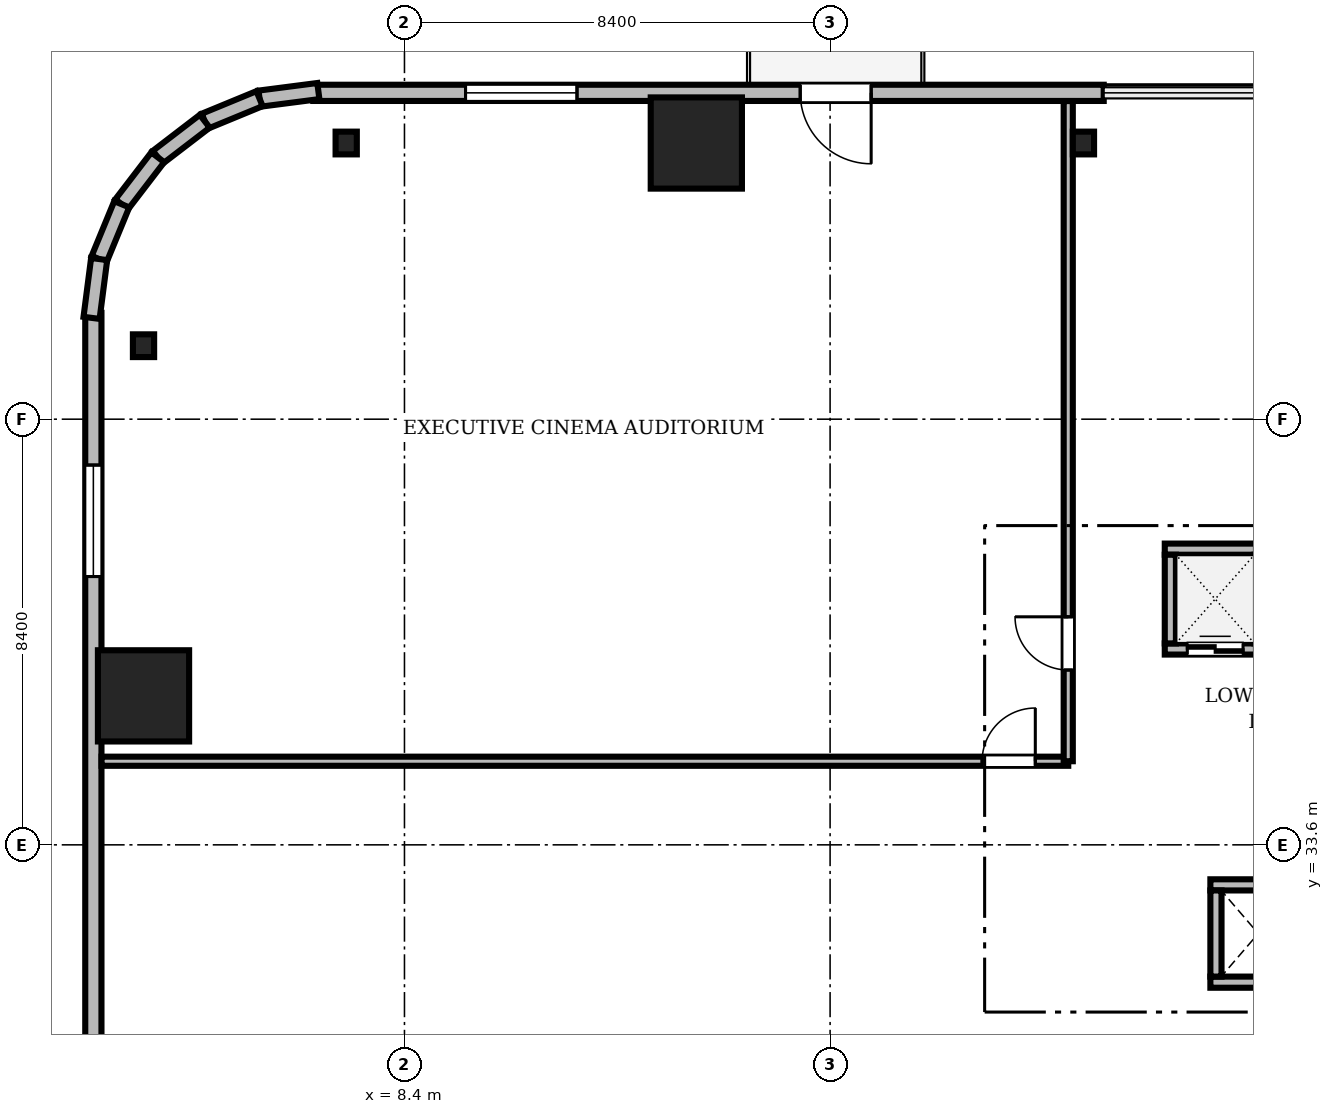
"""IFC4 building model, lengths in metres.
Left out: names, types, materials, properties, quantities, classifications, styles, units other than length and angle.
Written with IfcOpenShell. Run it as: python <this file> out.ifc"""

import sys

from ifc_helpers import new_model, si_unit, direction, frame, frame_2d, origin, origin_2d, place, context, subcontext, project, spatial, rectangle, i_section, extrude, source, transform, mapped, element, fill, save


model = new_model("IFC4")
c1 = context("Model", 3, precision=1e-05, world=origin(), true_north=direction((0.0, 1.0)))
c2 = subcontext(c1, "Body", "Model", "MODEL_VIEW")
j1 = project(units=[si_unit("LENGTHUNIT", "METRE"), si_unit("PLANEANGLEUNIT", "RADIAN")], contexts=[c1])
p1 = place(None, origin())
s1 = spatial("IfcSite", under=j1, at=p1, CompositionType="ELEMENT")
p2 = place(p1, origin())
s2 = spatial("IfcBuilding", under=s1, at=p2, CompositionType="ELEMENT")
p3 = place(p2, frame((0.0, 0.0, 89.65)))
s3 = spatial("IfcBuildingStorey", under=s2, at=p3, CompositionType="ELEMENT", Elevation=89.65)
m1 = source(origin(), c2, "Body", "SweptSolid", [
    extrude(rectangle(XDim=1.8, YDim=1.8, at=origin_2d()), origin(), (0.0, 0.0, 1.0), 3.0),
])
for number, where, z_axis, x_axis in (
    (1, (14.16, 47.45, 0.0), (0.0, 0.0, 1.0), (1.0, 0.0, 0.0)),
    (2, (3.25, 36.54, 0.0), (0.0, 0.0, 1.0), (1.0, 0.0, 0.0)),
):
    element("IfcColumn", number, at=place(p3, frame(where, z_axis=z_axis, x_axis=x_axis)), inside=s3, PredefinedType="COLUMN", context=c2, shape_type="MappedRepresentation", body=[
        mapped(m1, transform((0.0, 0.0, 0.0), scale=1.0)),
    ])
m2 = source(origin(), c2, "Body", "SweptSolid", [
    extrude(i_section(OverallWidth=0.419, OverallDepth=0.449, WebThickness=0.031, FlangeThickness=0.048, FilletRadius=0.015, at=origin_2d()), origin(), (0.0, 0.0, 1.0), 3.0),
])
for number, where, z_axis, x_axis in (
    (3, (21.8, 47.45, 0.0), (0.0, 0.0, 1.0), (1.0, 0.0, 0.0)),
    (4, (7.25, 47.45, 0.0), (0.0, 0.0, 1.0), (1.0, 0.0, 0.0)),
    (5, (3.25, 43.45, 0.0), (0.0, 0.0, 1.0), (1.0, 0.0, 0.0)),
):
    element("IfcColumn", number, at=place(p3, frame(where, z_axis=z_axis, x_axis=x_axis)), inside=s3, PredefinedType="COLUMN", context=c2, shape_type="MappedRepresentation", body=[
        mapped(m2, transform((0.0, 0.0, 0.0), scale=1.0)),
    ])
m3 = source(origin(), c2, "Body", "SweptSolid", [
    extrude(rectangle(XDim=15.6, YDim=0.32, at=frame_2d((7.8, 0.0))), origin(), (0.0, 0.0, 1.0), 3.0),
])
p4 = place(p3, frame((22.2, 48.44, 0.0), z_axis=(0.0, 0.0, 1.0), x_axis=(-1.0, 0.0, 0.0)))
e6 = element("IfcWall", 6, at=p4, inside=s3, PredefinedType="SOLIDWALL", context=c2, shape_type="MappedRepresentation", body=[
    mapped(m3, transform((0.0, 0.0, 0.0), scale=1.0)),
])
m4 = source(origin(), c2, "Body", "SweptSolid", [
    extrude(rectangle(XDim=1.4, YDim=2.3, at=frame_2d((0.7, 1.15))), frame((0.0, 0.17, 0.0), z_axis=(0.0, -1.0, 0.0), x_axis=(1.0, 0.0, 0.0)), (0.0, 0.0, 1.0), 0.34),
])
p5 = place(p4, frame((4.59, 0.0, 0.0)))
e7 = element("IfcOpeningElement", 7, at=p5, cuts=e6, PredefinedType="OPENING", context=c2, shape_type="MappedRepresentation", body=[
    mapped(m4, transform((0.0, 0.0, 0.0), scale=1.0)),
])
m5 = source(origin(), c2, "Body", "SweptSolid", [
    extrude(rectangle(XDim=2.2, YDim=2.4, at=frame_2d((1.1, 1.2))), frame((0.0, 0.17, 0.0), z_axis=(0.0, -1.0, 0.0), x_axis=(1.0, 0.0, 0.0)), (0.0, 0.0, 1.0), 0.34),
])
p6 = place(p4, frame((10.395, 0.0, 0.35)))
e8 = element("IfcOpeningElement", 8, at=p6, cuts=e6, PredefinedType="OPENING", context=c2, shape_type="MappedRepresentation", body=[
    mapped(m5, transform((0.0, 0.0, 0.0), scale=1.0)),
])
m6 = source(origin(), c2, "Body", "SweptSolid", [
    extrude(rectangle(XDim=15.6, YDim=0.32, at=frame_2d((7.8, 0.0))), origin(), (0.0, 0.0, 1.0), 3.0),
])
p7 = place(p3, frame((2.26, 44.1, 0.0), z_axis=(0.0, 0.0, 1.0), x_axis=(0.0, -1.0, 0.0)))
e9 = element("IfcWall", 9, at=p7, inside=s3, PredefinedType="SOLIDWALL", context=c2, shape_type="MappedRepresentation", body=[
    mapped(m6, transform((0.0, 0.0, 0.0), scale=1.0)),
])
p8 = place(p7, frame((3.005, 0.0, 0.35)))
e10 = element("IfcOpeningElement", 10, at=p8, cuts=e9, PredefinedType="OPENING", context=c2, shape_type="MappedRepresentation", body=[
    mapped(m5, transform((0.0, 0.0, 0.0), scale=1.0)),
])
m7 = source(origin(), c2, "Body", "SweptSolid", [
    extrude(rectangle(XDim=1.17, YDim=0.32, at=frame_2d((0.585, 0.0))), origin(), (0.0, 0.0, 1.0), 3.0),
])
p9 = place(p3, frame((6.7, 48.476, 0.0), z_axis=(0.0, 0.0, 1.0), x_axis=(-0.991735963317, -0.128295670475, 0.0)))
e11 = element("IfcWall", 11, at=p9, inside=s3, PredefinedType="SOLIDWALL", context=c2, shape_type="MappedRepresentation", body=[
    mapped(m7, transform((0.0, 0.0, 0.0), scale=1.0)),
])
m8 = source(origin(), c2, "Body", "SweptSolid", [
    extrude(rectangle(XDim=1.169, YDim=0.32, at=frame_2d((0.584, 0.0))), origin(), (0.0, 0.0, 1.0), 3.0),
])
p10 = place(p3, frame((5.54, 48.325, 0.0), z_axis=(0.0, 0.0, 1.0), x_axis=(-0.924552646638, -0.381054331552, 0.0)))
e12 = element("IfcWall", 12, at=p10, inside=s3, PredefinedType="SOLIDWALL", context=c2, shape_type="MappedRepresentation", body=[
    mapped(m8, transform((0.0, 0.0, 0.0), scale=1.0)),
])
m9 = source(origin(), c2, "Body", "SweptSolid", [
    extrude(rectangle(XDim=1.169, YDim=0.32, at=frame_2d((0.584, 0.0))), origin(), (0.0, 0.0, 1.0), 3.0),
])
p11 = place(p3, frame((4.459, 47.88, 0.0), z_axis=(0.0, 0.0, 1.0), x_axis=(-0.793663520347, -0.608356981114, 0.0)))
e13 = element("IfcWall", 13, at=p11, inside=s3, PredefinedType="SOLIDWALL", context=c2, shape_type="MappedRepresentation", body=[
    mapped(m9, transform((0.0, 0.0, 0.0), scale=1.0)),
])
m10 = source(origin(), c2, "Body", "SweptSolid", [
    extrude(rectangle(XDim=1.169, YDim=0.32, at=frame_2d((0.584, 0.0))), origin(), (0.0, 0.0, 1.0), 3.0),
])
p12 = place(p3, frame((3.531, 47.169, 0.0), z_axis=(0.0, 0.0, 1.0), x_axis=(-0.608387696831, -0.793639975269, 0.0)))
e14 = element("IfcWall", 14, at=p12, inside=s3, PredefinedType="SOLIDWALL", context=c2, shape_type="MappedRepresentation", body=[
    mapped(m10, transform((0.0, 0.0, 0.0), scale=1.0)),
])
p13 = place(p3, frame((2.82, 46.241, 0.0), z_axis=(0.0, 0.0, 1.0), x_axis=(-0.381054331552, -0.924552646638, 0.0)))
e15 = element("IfcWall", 15, at=p13, inside=s3, PredefinedType="SOLIDWALL", context=c2, shape_type="MappedRepresentation", body=[
    mapped(m8, transform((0.0, 0.0, 0.0), scale=1.0)),
])
p14 = place(p3, frame((2.375, 45.16, 0.0), z_axis=(0.0, 0.0, 1.0), x_axis=(-0.128295670475, -0.991735963317, 0.0)))
e16 = element("IfcWall", 16, at=p14, inside=s3, PredefinedType="SOLIDWALL", context=c2, shape_type="MappedRepresentation", body=[
    mapped(m7, transform((0.0, 0.0, 0.0), scale=1.0)),
])
m11 = source(origin(), c2, "Body", "SweptSolid", [
    extrude(rectangle(XDim=1.99, YDim=0.22, at=frame_2d((0.995, 0.0))), origin(), (0.0, 0.0, 1.0), 3.0),
])
p15 = place(p3, frame((23.405, 37.465, 0.0), z_axis=(0.0, 0.0, 1.0), x_axis=(1.0, 0.0, 0.0)))
e17 = element("IfcWall", 17, at=p15, inside=s3, PredefinedType="SOLIDWALL", context=c2, shape_type="MappedRepresentation", body=[
    mapped(m11, transform((0.0, 0.0, 0.0), scale=1.0)),
])
m12 = source(origin(), c2, "Body", "SweptSolid", [
    extrude(rectangle(XDim=1.1, YDim=2.2, at=frame_2d((0.55, 1.1))), frame((0.0, 0.12, 0.0), z_axis=(0.0, -1.0, 0.0), x_axis=(1.0, 0.0, 0.0)), (0.0, 0.0, 1.0), 0.24),
])
p16 = place(p15, frame((0.445, 0.0, 0.0)))
e18 = element("IfcOpeningElement", 18, at=p16, cuts=e17, PredefinedType="OPENING", context=c2, shape_type="MappedRepresentation", body=[
    mapped(m12, transform((0.0, 0.0, 0.0), scale=1.0)),
])
p17 = place(p3, frame((23.405, 39.435, 0.0), z_axis=(0.0, 0.0, 1.0), x_axis=(1.0, 0.0, 0.0)))
e19 = element("IfcWall", 19, at=p17, inside=s3, PredefinedType="SOLIDWALL", context=c2, shape_type="MappedRepresentation", body=[
    mapped(m11, transform((0.0, 0.0, 0.0), scale=1.0)),
])
m13 = source(origin(), c2, "Body", "SweptSolid", [
    extrude(rectangle(XDim=1.75, YDim=0.22, at=frame_2d((0.875, 0.0))), origin(), (0.0, 0.0, 1.0), 3.0),
])
p18 = place(p3, frame((23.515, 37.575, 0.0), z_axis=(0.0, 0.0, 1.0), x_axis=(0.0, 1.0, 0.0)))
e20 = element("IfcWall", 20, at=p18, inside=s3, PredefinedType="SOLIDWALL", context=c2, shape_type="MappedRepresentation", body=[
    mapped(m13, transform((0.0, 0.0, 0.0), scale=1.0)),
])
m14 = source(origin(), c2, "Body", "SweptSolid", [
    extrude(rectangle(XDim=1.89, YDim=0.22, at=frame_2d((0.945, 0.0))), origin(), (0.0, 0.0, 1.0), 3.0),
])
for number, where, z_axis, x_axis in (
    (21, (24.305, 30.89, 0.0), (0.0, 0.0, 1.0), (1.0, 0.0, 0.0)),
    (22, (24.305, 32.81, 0.0), (0.0, 0.0, 1.0), (1.0, 0.0, 0.0)),
):
    element("IfcWall", number, at=place(p3, frame(where, z_axis=z_axis, x_axis=x_axis)), inside=s3, PredefinedType="SOLIDWALL", context=c2, shape_type="MappedRepresentation", body=[
        mapped(m14, transform((0.0, 0.0, 0.0), scale=1.0)),
    ])
m15 = source(origin(), c2, "Body", "SweptSolid", [
    extrude(rectangle(XDim=1.7, YDim=0.22, at=frame_2d((0.85, 0.0))), origin(), (0.0, 0.0, 1.0), 3.0),
])
p19 = place(p3, frame((24.415, 31.0, 0.0), z_axis=(0.0, 0.0, 1.0), x_axis=(0.0, 1.0, 0.0)))
e23 = element("IfcWall", 23, at=p19, inside=s3, PredefinedType="SOLIDWALL", context=c2, shape_type="MappedRepresentation", body=[
    mapped(m15, transform((0.0, 0.0, 0.0), scale=1.0)),
])
m16 = source(origin(), c2, "Body", "SweptSolid", [
    extrude(rectangle(XDim=19.078, YDim=0.18, at=frame_2d((9.539, 0.0))), origin(), (0.0, 0.0, 1.0), 2.276),
])
p20 = place(p3, frame((2.422, 35.25, 0.0), z_axis=(0.0, 0.0, 1.0), x_axis=(1.0, 0.0, 0.0)))
e24 = element("IfcWall", 24, at=p20, inside=s3, PredefinedType="PARTITIONING", context=c2, shape_type="MappedRepresentation", body=[
    mapped(m16, transform((0.0, 0.0, 0.0), scale=1.0)),
])
m17 = source(origin(), c2, "Body", "SweptSolid", [
    extrude(rectangle(XDim=1.05, YDim=2.2, at=frame_2d((0.525, 1.1))), frame((0.0, 0.1, 0.0), z_axis=(0.0, -1.0, 0.0), x_axis=(1.0, 0.0, 0.0)), (0.0, 0.0, 1.0), 0.2),
])
p21 = place(p20, frame((17.378, 0.0, 0.0)))
e25 = element("IfcOpeningElement", 25, at=p21, cuts=e24, PredefinedType="OPENING", context=c2, shape_type="MappedRepresentation", body=[
    mapped(m17, transform((0.0, 0.0, 0.0), scale=1.0)),
])
m18 = source(origin(), c2, "Body", "SweptSolid", [
    extrude(rectangle(XDim=13.028, YDim=0.18, at=frame_2d((6.514, 0.0))), origin(), (0.0, 0.0, 1.0), 2.276),
])
p22 = place(p3, frame((21.5, 35.25, 0.0), z_axis=(0.0, 0.0, 1.0), x_axis=(0.0, 1.0, 0.0)))
e26 = element("IfcWall", 26, at=p22, inside=s3, PredefinedType="PARTITIONING", context=c2, shape_type="MappedRepresentation", body=[
    mapped(m18, transform((0.0, 0.0, 0.0), scale=1.0)),
])
p23 = place(p22, frame((1.8, 0.0, 0.0)))
e27 = element("IfcOpeningElement", 27, at=p23, cuts=e26, PredefinedType="OPENING", context=c2, shape_type="MappedRepresentation", body=[
    mapped(m17, transform((0.0, 0.0, 0.0), scale=1.0)),
])
m19 = source(origin(), c2, "Body", "SweptSolid", [
    extrude(rectangle(XDim=1.4, YDim=2.3, at=frame_2d((0.7, 1.15))), frame((0.0, 0.025, 0.0), z_axis=(0.0, -1.0, 0.0), x_axis=(1.0, 0.0, 0.0)), (0.0, 0.0, 1.0), 0.05),
])
p24 = place(p5, frame((1.4, 0.0, 0.0), z_axis=(0.0, 0.0, 1.0), x_axis=(-1.0, 0.0, 0.0)))
e28 = element("IfcDoor", 28, at=p24, inside=s3, OperationType="DOUBLE_DOOR_SLIDING", PredefinedType="DOOR", context=c2, shape_type="MappedRepresentation", body=[
    mapped(m19, transform((0.0, 0.0, 0.0), scale=1.0)),
])
fill(e7, e28)
m20 = source(origin(), c2, "Body", "SweptSolid", [
    extrude(rectangle(XDim=2.2, YDim=2.4, at=frame_2d((1.1, 1.2))), frame((0.0, 0.03, 0.0), z_axis=(0.0, -1.0, 0.0), x_axis=(1.0, 0.0, 0.0)), (0.0, 0.0, 1.0), 0.06),
])
p25 = place(p6, origin())
e29 = element("IfcWindow", 29, at=p25, inside=s3, PartitioningType="SINGLE_PANEL", PredefinedType="WINDOW", context=c2, shape_type="MappedRepresentation", body=[
    mapped(m20, transform((0.0, 0.0, 0.0), scale=1.0)),
])
fill(e8, e29)
p26 = place(p8, origin())
e30 = element("IfcWindow", 30, at=p26, inside=s3, PartitioningType="SINGLE_PANEL", PredefinedType="WINDOW", context=c2, shape_type="MappedRepresentation", body=[
    mapped(m20, transform((0.0, 0.0, 0.0), scale=1.0)),
])
fill(e10, e30)
m21 = source(origin(), c2, "Body", "SweptSolid", [
    extrude(rectangle(XDim=1.1, YDim=2.2, at=frame_2d((0.55, 1.1))), frame((0.0, 0.025, 0.0), z_axis=(0.0, -1.0, 0.0), x_axis=(1.0, 0.0, 0.0)), (0.0, 0.0, 1.0), 0.05),
])
p27 = place(p16, origin())
e31 = element("IfcDoor", 31, at=p27, inside=s3, OperationType="DOUBLE_DOOR_SLIDING", PredefinedType="DOOR", context=c2, shape_type="MappedRepresentation", body=[
    mapped(m21, transform((0.0, 0.0, 0.0), scale=1.0)),
])
fill(e18, e31)
m22 = source(origin(), c2, "Body", "SweptSolid", [
    extrude(rectangle(XDim=1.05, YDim=2.2, at=frame_2d((0.525, 1.1))), frame((0.0, 0.025, 0.0), z_axis=(0.0, -1.0, 0.0), x_axis=(1.0, 0.0, 0.0)), (0.0, 0.0, 1.0), 0.05),
])
p28 = place(p21, origin())
e32 = element("IfcDoor", 32, at=p28, inside=s3, OperationType="SINGLE_SWING_RIGHT", PredefinedType="DOOR", context=c2, shape_type="MappedRepresentation", body=[
    mapped(m22, transform((0.0, 0.0, 0.0), scale=1.0)),
])
fill(e25, e32)
p29 = place(p23, origin())
e33 = element("IfcDoor", 33, at=p29, inside=s3, OperationType="SINGLE_SWING_RIGHT", PredefinedType="DOOR", context=c2, shape_type="MappedRepresentation", body=[
    mapped(m22, transform((0.0, 0.0, 0.0), scale=1.0)),
])
fill(e27, e33)
save(model, sys.argv[1])
